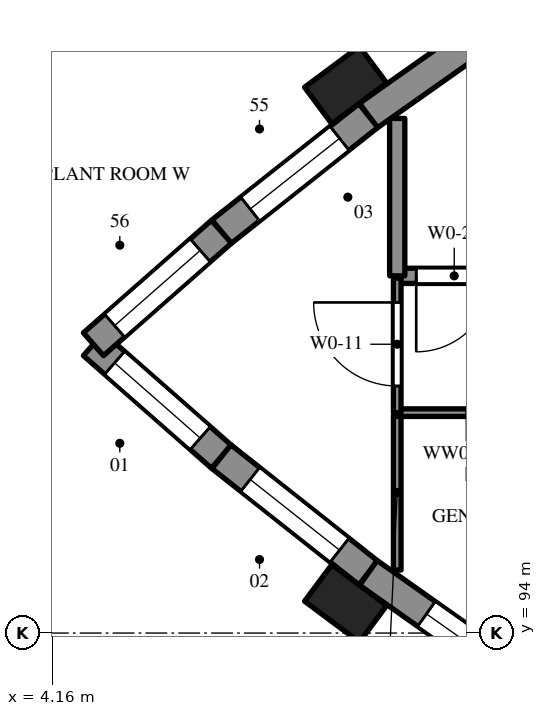
"""IFC4 building model, lengths in metres.
Left out: names, types, materials, properties, quantities, classifications, styles, units other than length and angle.
Written with IfcOpenShell. Run it as: python <this file> out.ifc"""

import sys

from ifc_helpers import new_model, si_unit, direction, frame, frame_2d, origin, origin_2d, place, context, subcontext, project, spatial, rectangle, extrude, element, fill, save


model = new_model("IFC4")
c1 = context("Model", 3, precision=1e-05, world=origin(), true_north=direction((0.0, 1.0)))
c2 = subcontext(c1, "Body", "Model", "MODEL_VIEW")
j1 = project(units=[si_unit("LENGTHUNIT", "METRE"), si_unit("PLANEANGLEUNIT", "RADIAN")], contexts=[c1])
p1 = place(None, origin())
s1 = spatial("IfcSite", under=j1, at=p1, CompositionType="ELEMENT")
p2 = place(p1, origin())
s2 = spatial("IfcBuilding", under=s1, at=p2, CompositionType="ELEMENT")
p3 = place(p2, origin())
s3 = spatial("IfcBuildingStorey", under=s2, at=p3, CompositionType="ELEMENT", Elevation=0.0)
p4 = place(p3, frame((16.9, 98.7, -0.25), z_axis=(0.0, 0.0, 1.0), x_axis=(-1.0, 0.0, 0.0)))
e1 = element("IfcWall", 1, at=p4, inside=s3, PredefinedType="SHEAR", context=c2, shape_type="SweptSolid", body=[
    extrude(rectangle(XDim=8.2, YDim=0.2, at=frame_2d((4.1, 0.0))), origin(), (0.0, 0.0, 1.0), 5.65),
])
p5 = place(p4, frame((6.95, 0.0, 0.25)))
e2 = element("IfcOpeningElement", 2, at=p5, cuts=e1, PredefinedType="OPENING", context=c2, shape_type="SweptSolid", body=[
    extrude(rectangle(XDim=1.0, YDim=2.4, at=frame_2d((0.5, 1.2))), frame((0.0, 0.11, 0.0), z_axis=(0.0, -1.0, 0.0), x_axis=(1.0, 0.0, 0.0)), (0.0, 0.0, 1.0), 0.22),
])
p6 = place(p3, frame((8.7, 98.7, -0.25), z_axis=(0.0, 0.0, 1.0), x_axis=(0.0, 1.0, 0.0)))
e3 = element("IfcWall", 3, at=p6, inside=s3, PredefinedType="SHEAR", context=c2, shape_type="SweptSolid", body=[
    extrude(rectangle(XDim=2.071, YDim=0.2, at=frame_2d((1.035, 0.0))), origin(), (0.0, 0.0, 1.0), 5.65),
])
p7 = place(p3, frame((4.703, 97.8, -0.25), z_axis=(0.0, 0.0, 1.0), x_axis=(0.751212351098, -0.660060605973, 0.0)))
e4 = element("IfcWall", 4, at=p7, inside=s3, PredefinedType="SOLIDWALL", context=c2, shape_type="SweptSolid", body=[
    extrude(rectangle(XDim=2.242, YDim=0.4, at=frame_2d((1.121, 0.0))), origin(), (0.0, 0.0, 1.0), 5.65),
])
p8 = place(p7, frame((0.371, 0.0, 2.65)))
e5 = element("IfcOpeningElement", 5, at=p8, cuts=e4, PredefinedType="OPENING", context=c2, shape_type="SweptSolid", body=[
    extrude(rectangle(XDim=1.5, YDim=0.6, at=frame_2d((0.75, 0.3))), frame((0.0, 0.21, 0.0), z_axis=(0.0, -1.0, 0.0), x_axis=(1.0, 0.0, 0.0)), (0.0, 0.0, 1.0), 0.42),
])
p9 = place(p3, frame((6.387, 96.32, -0.25), z_axis=(0.0, 0.0, 1.0), x_axis=(0.784278812541, -0.620408530082, 0.0)))
e6 = element("IfcWall", 6, at=p9, inside=s3, PredefinedType="SOLIDWALL", context=c2, shape_type="SweptSolid", body=[
    extrude(rectangle(XDim=2.464, YDim=0.4, at=frame_2d((1.232, 0.0))), origin(), (0.0, 0.0, 1.0), 5.65),
])
p10 = place(p9, frame((0.482, 0.0, 2.65)))
e7 = element("IfcOpeningElement", 7, at=p10, cuts=e6, PredefinedType="OPENING", context=c2, shape_type="SweptSolid", body=[
    extrude(rectangle(XDim=1.5, YDim=0.6, at=frame_2d((0.75, 0.3))), frame((0.0, 0.21, 0.0), z_axis=(0.0, -1.0, 0.0), x_axis=(1.0, 0.0, 0.0)), (0.0, 0.0, 1.0), 0.42),
])
p11 = place(p3, frame((8.32, 94.792, -0.25), z_axis=(0.0, 0.0, 1.0), x_axis=(0.817028877428, -0.576596751161, 0.0)))
e8 = element("IfcWall", 8, at=p11, inside=s3, PredefinedType="SOLIDWALL", context=c2, shape_type="SweptSolid", body=[
    extrude(rectangle(XDim=2.772, YDim=0.4, at=frame_2d((1.386, 0.0))), origin(), (0.0, 0.0, 1.0), 5.65),
])
p12 = place(p11, frame((0.936, 0.0, 1.85)))
e9 = element("IfcOpeningElement", 9, at=p12, cuts=e8, PredefinedType="OPENING", context=c2, shape_type="SweptSolid", body=[
    extrude(rectangle(XDim=0.9, YDim=0.6, at=frame_2d((0.45, 0.3))), frame((0.0, 0.21, 0.0), z_axis=(0.0, -1.0, 0.0), x_axis=(1.0, 0.0, 0.0)), (0.0, 0.0, 1.0), 0.42),
])
p13 = place(p3, frame((10.585, 102.407, -0.25), z_axis=(0.0, 0.0, 1.0), x_axis=(-0.817070367038, -0.57653795652, 0.0)))
e10 = element("IfcWall", 10, at=p13, inside=s3, PredefinedType="SOLIDWALL", context=c2, shape_type="SweptSolid", body=[
    extrude(rectangle(XDim=2.772, YDim=0.4, at=frame_2d((1.386, 0.0))), origin(), (0.0, 0.0, 1.0), 5.65),
])
p14 = place(p3, frame((8.32, 100.809, -0.25), z_axis=(0.0, 0.0, 1.0), x_axis=(-0.784278812541, -0.620408530082, 0.0)))
e11 = element("IfcWall", 11, at=p14, inside=s3, PredefinedType="SOLIDWALL", context=c2, shape_type="SweptSolid", body=[
    extrude(rectangle(XDim=2.464, YDim=0.4, at=frame_2d((1.232, 0.0))), origin(), (0.0, 0.0, 1.0), 5.65),
])
p15 = place(p14, frame((0.482, 0.0, 2.65)))
e12 = element("IfcOpeningElement", 12, at=p15, cuts=e11, PredefinedType="OPENING", context=c2, shape_type="SweptSolid", body=[
    extrude(rectangle(XDim=1.5, YDim=0.6, at=frame_2d((0.75, 0.3))), frame((0.0, 0.21, 0.0), z_axis=(0.0, -1.0, 0.0), x_axis=(1.0, 0.0, 0.0)), (0.0, 0.0, 1.0), 0.42),
])
p16 = place(p3, frame((6.387, 99.28, -0.25), z_axis=(0.0, 0.0, 1.0), x_axis=(-0.751212351098, -0.660060605973, 0.0)))
e13 = element("IfcWall", 13, at=p16, inside=s3, PredefinedType="SOLIDWALL", context=c2, shape_type="SweptSolid", body=[
    extrude(rectangle(XDim=2.242, YDim=0.4, at=frame_2d((1.121, 0.0))), origin(), (0.0, 0.0, 1.0), 5.65),
])
p17 = place(p16, frame((0.371, 0.0, 2.65)))
e14 = element("IfcOpeningElement", 14, at=p17, cuts=e13, PredefinedType="OPENING", context=c2, shape_type="SweptSolid", body=[
    extrude(rectangle(XDim=1.5, YDim=0.6, at=frame_2d((0.75, 0.3))), frame((0.0, 0.21, 0.0), z_axis=(0.0, -1.0, 0.0), x_axis=(1.0, 0.0, 0.0)), (0.0, 0.0, 1.0), 0.42),
])
for number, where, z_axis, x_axis in (
    (15, (8.021, 94.391, -0.25), (0.0, 0.0, 1.0), (0.802, -0.597, 0.0)),
    (16, (8.021, 101.209, -0.25), (0.0, 0.0, 1.0), (-0.802, -0.597, 0.0)),
):
    element("IfcColumn", number, at=place(p3, frame(where, z_axis=z_axis, x_axis=x_axis)), inside=s3, PredefinedType="PILASTER", context=c2, shape_type="SweptSolid", body=[
        extrude(rectangle(XDim=0.9, YDim=0.6, at=origin_2d()), origin(), (0.0, 0.0, 1.0), 5.65),
    ])
p18 = place(p3, frame((8.7, 94.829, 0.0), z_axis=(0.0, 0.0, 1.0), x_axis=(0.0, 1.0, 0.0)))
e17 = element("IfcWall", 17, at=p18, inside=s3, PredefinedType="PARTITIONING", context=c2, shape_type="SweptSolid", body=[
    extrude(rectangle(XDim=2.041, YDim=0.1, at=frame_2d((1.021, 0.0))), origin(), (0.0, 0.0, 1.0), 5.12),
])
p19 = place(p3, frame((11.433, 96.9, 0.0), z_axis=(0.0, 0.0, 1.0), x_axis=(-1.0, 0.0, 0.0)))
e18 = element("IfcWall", 18, at=p19, inside=s3, PredefinedType="PARTITIONING", context=c2, shape_type="SweptSolid", body=[
    extrude(rectangle(XDim=2.733, YDim=0.1, at=frame_2d((1.367, 0.0))), origin(), (0.0, 0.0, 1.0), 5.12),
])
p20 = place(p19, frame((0.917, 0.0, 0.0)))
e19 = element("IfcOpeningElement", 19, at=p20, cuts=e18, PredefinedType="OPENING", context=c2, shape_type="SweptSolid", body=[
    extrude(rectangle(XDim=0.9, YDim=2.1, at=frame_2d((0.45, 1.05))), frame((0.0, 0.06, 0.0), z_axis=(0.0, -1.0, 0.0), x_axis=(1.0, 0.0, 0.0)), (0.0, 0.0, 1.0), 0.12),
])
p21 = place(p3, frame((8.7, 96.9, 0.0), z_axis=(0.0, 0.0, 1.0), x_axis=(0.0, 1.0, 0.0)))
e20 = element("IfcWall", 20, at=p21, inside=s3, PredefinedType="PARTITIONING", context=c2, shape_type="SweptSolid", body=[
    extrude(rectangle(XDim=1.77, YDim=0.1, at=frame_2d((0.885, 0.0))), origin(), (0.0, 0.0, 1.0), 5.12),
])
p22 = place(p21, frame((0.35, 0.0, 0.0)))
e21 = element("IfcOpeningElement", 21, at=p22, cuts=e20, PredefinedType="OPENING", context=c2, shape_type="SweptSolid", body=[
    extrude(rectangle(XDim=1.1, YDim=2.1, at=frame_2d((0.55, 1.05))), frame((0.0, 0.06, 0.0), z_axis=(0.0, -1.0, 0.0), x_axis=(1.0, 0.0, 0.0)), (0.0, 0.0, 1.0), 0.12),
])
p23 = place(p8, origin())
e22 = element("IfcWindow", 22, at=p23, inside=s3, PartitioningType="SINGLE_PANEL", PredefinedType="WINDOW", context=c2, shape_type="SweptSolid", body=[
    extrude(rectangle(XDim=1.5, YDim=0.6, at=frame_2d((0.75, 0.3))), frame((0.0, 0.03, 0.0), z_axis=(0.0, -1.0, 0.0), x_axis=(1.0, 0.0, 0.0)), (0.0, 0.0, 1.0), 0.06),
])
fill(e5, e22)
p24 = place(p10, origin())
e23 = element("IfcWindow", 23, at=p24, inside=s3, PartitioningType="SINGLE_PANEL", PredefinedType="WINDOW", context=c2, shape_type="SweptSolid", body=[
    extrude(rectangle(XDim=1.5, YDim=0.6, at=frame_2d((0.75, 0.3))), frame((0.0, 0.03, 0.0), z_axis=(0.0, -1.0, 0.0), x_axis=(1.0, 0.0, 0.0)), (0.0, 0.0, 1.0), 0.06),
])
fill(e7, e23)
p25 = place(p12, origin())
e24 = element("IfcWindow", 24, at=p25, inside=s3, PartitioningType="SINGLE_PANEL", PredefinedType="WINDOW", context=c2, shape_type="SweptSolid", body=[
    extrude(rectangle(XDim=0.9, YDim=0.6, at=frame_2d((0.45, 0.3))), frame((0.0, 0.03, 0.0), z_axis=(0.0, -1.0, 0.0), x_axis=(1.0, 0.0, 0.0)), (0.0, 0.0, 1.0), 0.06),
])
fill(e9, e24)
p26 = place(p15, origin())
e25 = element("IfcWindow", 25, at=p26, inside=s3, PartitioningType="SINGLE_PANEL", PredefinedType="WINDOW", context=c2, shape_type="SweptSolid", body=[
    extrude(rectangle(XDim=1.5, YDim=0.6, at=frame_2d((0.75, 0.3))), frame((0.0, 0.03, 0.0), z_axis=(0.0, -1.0, 0.0), x_axis=(1.0, 0.0, 0.0)), (0.0, 0.0, 1.0), 0.06),
])
fill(e12, e25)
p27 = place(p17, origin())
e26 = element("IfcWindow", 26, at=p27, inside=s3, PartitioningType="SINGLE_PANEL", PredefinedType="WINDOW", context=c2, shape_type="SweptSolid", body=[
    extrude(rectangle(XDim=1.5, YDim=0.6, at=frame_2d((0.75, 0.3))), frame((0.0, 0.03, 0.0), z_axis=(0.0, -1.0, 0.0), x_axis=(1.0, 0.0, 0.0)), (0.0, 0.0, 1.0), 0.06),
])
fill(e14, e26)
p28 = place(p22, origin())
e27 = element("IfcDoor", 27, at=p28, inside=s3, OperationType="SINGLE_SWING_RIGHT", PredefinedType="DOOR", context=c2, shape_type="SweptSolid", body=[
    extrude(rectangle(XDim=1.1, YDim=2.1, at=frame_2d((0.55, 1.05))), frame((0.0, 0.025, 0.0), z_axis=(0.0, -1.0, 0.0), x_axis=(1.0, 0.0, 0.0)), (0.0, 0.0, 1.0), 0.05),
])
fill(e21, e27)
p29 = place(p5, origin())
e28 = element("IfcDoor", 28, at=p29, inside=s3, OperationType="SINGLE_SWING_RIGHT", PredefinedType="DOOR", context=c2, shape_type="SweptSolid", body=[
    extrude(rectangle(XDim=1.0, YDim=2.4, at=frame_2d((0.5, 1.2))), frame((0.0, 0.025, 0.0), z_axis=(0.0, -1.0, 0.0), x_axis=(1.0, 0.0, 0.0)), (0.0, 0.0, 1.0), 0.05),
])
fill(e2, e28)
save(model, sys.argv[1])
